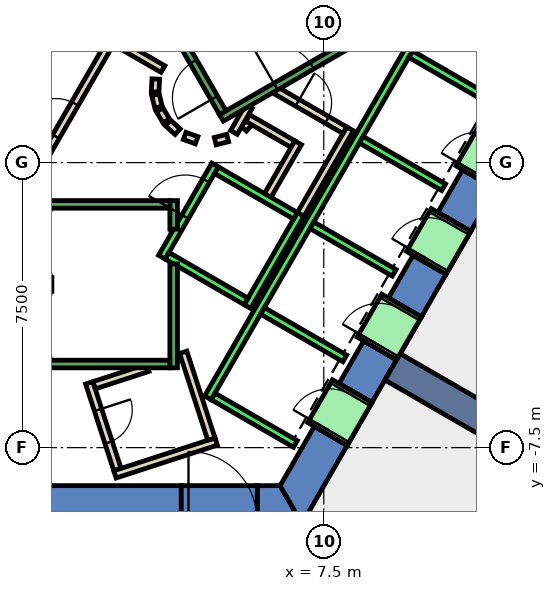
"""IFC4 building model, lengths in metres.
Left out: names, types, materials, properties, quantities, classifications, styles, units other than length and angle.
Written with IfcOpenShell. Run it as: python <this file> out.ifc"""

import sys

from ifc_helpers import new_model, si_unit, direction, frame, frame_2d, origin, place, context, subcontext, project, spatial, polyline, rectangle, outline, extrude, element, fill, save


model = new_model("IFC4")
c1 = context("Model", 3, precision=1e-05, world=origin(), true_north=direction((0.0, 1.0)))
c2 = subcontext(c1, "Body", "Model", "MODEL_VIEW")
j1 = project(units=[si_unit("LENGTHUNIT", "METRE"), si_unit("PLANEANGLEUNIT", "RADIAN")], contexts=[c1])
p1 = place(None, origin())
s1 = spatial("IfcSite", under=j1, at=p1, CompositionType="ELEMENT")
p2 = place(p1, origin())
s2 = spatial("IfcBuilding", under=s1, at=p2, CompositionType="ELEMENT")
p3 = place(p2, frame((0.0, 0.0, 30.0)))
s3 = spatial("IfcBuildingStorey", under=s2, at=p3, CompositionType="ELEMENT", Elevation=30.0)
p4 = place(p3, frame((0.0, 0.0, -0.45)))
e1 = element("IfcWall", 1, at=p4, inside=s3, PredefinedType="SHEAR", context=c2, shape_type="SweptSolid", body=[
    extrude(outline(polyline([(8.517, 11.748), (7.651, 11.248), (12.702, 2.5), (13.856, 2.5), (8.517, 11.748)])), origin(), (0.0, 0.0, 1.0), 4.85),
])
p5 = place(p3, frame((0.0, 0.0, -0.45)))
e2 = element("IfcWall", 2, at=p5, inside=s3, PredefinedType="SHEAR", context=c2, shape_type="SweptSolid", body=[
    extrude(outline(polyline([(3.75, -9.5), (3.75, -8.5), (-6.351, -8.5), (-6.928, -9.5), (3.75, -9.5)])), origin(), (0.0, 0.0, 1.0), 4.85),
])
p6 = place(p3, frame((0.0, 0.0, -0.45)))
e3 = element("IfcWall", 3, at=p6, inside=s3, PredefinedType="SHEAR", context=c2, shape_type="SweptSolid", body=[
    extrude(outline(polyline([(5.75, -8.5), (5.75, -9.5), (6.928, -9.5), (6.351, -8.5), (5.75, -8.5)])), origin(), (0.0, 0.0, 1.0), 4.85),
])
p7 = place(p3, frame((0.0, 0.0, 3.6)))
e4 = element("IfcWall", 4, at=p7, inside=s3, PredefinedType="SHEAR", context=c2, shape_type="SweptSolid", body=[
    extrude(outline(polyline([(5.75, -9.5), (5.75, -8.5), (3.75, -8.5), (3.75, -9.5), (5.75, -9.5)])), origin(), (0.0, 0.0, 1.0), 0.8),
])
p8 = place(p3, frame((0.0, 0.0, -0.45)))
e5 = element("IfcWall", 5, at=p8, inside=s3, PredefinedType="SHEAR", context=c2, shape_type="SweptSolid", body=[
    extrude(outline(polyline([(8.117, -7.44), (7.252, -6.94), (6.351, -8.5), (6.928, -9.5), (8.117, -7.44)])), origin(), (0.0, 0.0, 1.0), 4.85),
])
p9 = place(p3, frame((0.0, 0.0, -0.45)))
e6 = element("IfcWall", 6, at=p9, inside=s3, PredefinedType="SHEAR", context=c2, shape_type="SweptSolid", body=[
    extrude(outline(polyline([(9.417, -5.189), (8.551, -4.689), (7.902, -5.814), (8.767, -6.314), (9.417, -5.189)])), origin(), (0.0, 0.0, 1.0), 4.85),
])
p10 = place(p3, frame((0.0, 0.0, -0.45)))
e7 = element("IfcWall", 7, at=p10, inside=s3, PredefinedType="SHEAR", context=c2, shape_type="SweptSolid", body=[
    extrude(outline(polyline([(10.717, -2.937), (9.851, -2.437), (9.201, -3.563), (10.067, -4.063), (10.717, -2.937)])), origin(), (0.0, 0.0, 1.0), 4.85),
])
p11 = place(p3, frame((0.0, 0.0, -0.45)))
e8 = element("IfcWall", 8, at=p11, inside=s3, PredefinedType="SHEAR", context=c2, shape_type="SweptSolid", body=[
    extrude(outline(polyline([(12.017, -0.686), (11.151, -0.186), (10.501, -1.311), (11.367, -1.811), (12.017, -0.686)])), origin(), (0.0, 0.0, 1.0), 4.85),
])
p12 = place(p3, frame((0.0, 0.0, 3.6)))
e9 = element("IfcWall", 9, at=p12, inside=s3, PredefinedType="SHEAR", context=c2, shape_type="SweptSolid", body=[
    extrude(outline(polyline([(8.767, -6.314), (7.902, -5.814), (7.252, -6.94), (8.117, -7.44), (8.767, -6.314)])), origin(), (0.0, 0.0, 1.0), 0.8),
])
p13 = place(p3, frame((0.0, 0.0, 3.6)))
e10 = element("IfcWall", 10, at=p13, inside=s3, PredefinedType="SHEAR", context=c2, shape_type="SweptSolid", body=[
    extrude(outline(polyline([(10.067, -4.063), (9.201, -3.563), (8.551, -4.689), (9.417, -5.189), (10.067, -4.063)])), origin(), (0.0, 0.0, 1.0), 0.8),
])
p14 = place(p3, frame((0.0, 0.0, 3.6)))
e11 = element("IfcWall", 11, at=p14, inside=s3, PredefinedType="SHEAR", context=c2, shape_type="SweptSolid", body=[
    extrude(outline(polyline([(11.367, -1.811), (10.501, -1.311), (9.851, -2.437), (10.717, -2.937), (11.367, -1.811)])), origin(), (0.0, 0.0, 1.0), 0.8),
])
p15 = place(p3, frame((0.0, 0.0, 3.6)))
e12 = element("IfcWall", 12, at=p15, inside=s3, PredefinedType="SHEAR", context=c2, shape_type="SweptSolid", body=[
    extrude(outline(polyline([(12.667, 0.44), (11.801, 0.94), (11.151, -0.186), (12.017, -0.686), (12.667, 0.44)])), origin(), (0.0, 0.0, 1.0), 0.8),
])
p16 = place(p3, frame((9.31, -5.375, -0.45), z_axis=(0.0, 0.0, 1.0), x_axis=(0.866017533419, -0.500013631625, 0.0)))
e13 = element("IfcWall", 13, at=p16, inside=s3, PredefinedType="SHEAR", context=c2, shape_type="SweptSolid", body=[
    extrude(rectangle(XDim=9.0, YDim=0.8, at=frame_2d((4.5, 0.0))), origin(), (0.0, 0.0, 1.0), 4.85),
])
p17 = place(p3, frame((5.39, 0.898, 0.0), z_axis=(0.0, 0.0, 1.0), x_axis=(0.673828488714, 0.738887791073, 0.0)))
e14 = element("IfcWall", 14, at=p17, inside=s3, PredefinedType="PARTITIONING", context=c2, shape_type="SweptSolid", body=[
    extrude(rectangle(XDim=0.263, YDim=0.2, at=frame_2d((0.131, 0.0))), origin(), (0.0, 0.0, 1.0), 4.4),
])
p18 = place(p3, frame((5.499, 1.172, 0.0), z_axis=(0.0, 0.0, 1.0), x_axis=(0.866333505267, -0.499465972466, 0.0)))
e15 = element("IfcWall", 15, at=p18, inside=s3, PredefinedType="PARTITIONING", context=c2, shape_type="SweptSolid", body=[
    extrude(rectangle(XDim=1.374, YDim=0.2, at=frame_2d((0.687, 0.0))), origin(), (0.0, 0.0, 1.0), 4.4),
])
p19 = place(p3, frame((6.826, 0.522, 0.0), z_axis=(0.0, 0.0, 1.0), x_axis=(-0.500016722714, -0.866015748706, 0.0)))
e16 = element("IfcWall", 16, at=p19, inside=s3, PredefinedType="PARTITIONING", context=c2, shape_type="SweptSolid", body=[
    extrude(rectangle(XDim=1.7, YDim=0.2, at=frame_2d((0.85, 0.0))), origin(), (0.0, 0.0, 1.0), 4.4),
])
p20 = place(p3, frame((8.192, 0.888, 0.0), z_axis=(0.0, 0.0, 1.0), x_axis=(-0.499940625693, -0.866059680843, 0.0)))
e17 = element("IfcWall", 17, at=p20, inside=s3, PredefinedType="PARTITIONING", context=c2, shape_type="SweptSolid", body=[
    extrude(rectangle(XDim=2.68, YDim=0.2, at=frame_2d((1.34, 0.0))), origin(), (0.0, 0.0, 1.0), 4.4),
])
p21 = place(p3, frame((5.135, 0.793, 0.0), z_axis=(0.0, 0.0, 1.0), x_axis=(0.499526442893, 0.866298639529, 0.0)))
e18 = element("IfcWall", 18, at=p21, inside=s3, PredefinedType="PARTITIONING", context=c2, shape_type="SweptSolid", body=[
    extrude(rectangle(XDim=0.791, YDim=0.2, at=frame_2d((0.396, 0.0))), origin(), (0.0, 0.0, 1.0), 4.4),
])
p22 = place(p3, frame((6.25, 1.894, 0.0), z_axis=(0.0, 0.0, 1.0), x_axis=(0.866043184279, -0.499969202016, 0.0)))
e19 = element("IfcWall", 19, at=p22, inside=s3, PredefinedType="PARTITIONING", context=c2, shape_type="SweptSolid", body=[
    extrude(rectangle(XDim=2.084, YDim=0.2, at=frame_2d((1.042, 0.0))), origin(), (0.0, 0.0, 1.0), 4.4),
])
p23 = place(p22, frame((0.642, 0.0, 0.0)))
e20 = element("IfcOpeningElement", 20, at=p23, cuts=e19, PredefinedType="OPENING", context=c2, shape_type="SweptSolid", body=[
    extrude(rectangle(XDim=0.9, YDim=2.1, at=frame_2d((0.45, 1.05))), frame((0.0, 0.11, 0.0), z_axis=(0.0, -1.0, 0.0), x_axis=(1.0, 0.0, 0.0)), (0.0, 0.0, 1.0), 0.22),
])
p24 = place(p3, frame((2.869, -5.4, 0.0), z_axis=(0.0, 0.0, 1.0), x_axis=(-0.950892787506, -0.309520446287, 0.0)))
e21 = element("IfcWall", 21, at=p24, inside=s3, PredefinedType="PARTITIONING", context=c2, shape_type="SweptSolid", body=[
    extrude(rectangle(XDim=1.487, YDim=0.2, at=frame_2d((0.743, 0.0))), origin(), (0.0, 0.0, 1.0), 4.4),
])
p25 = place(p3, frame((1.328, -5.795, 0.0), z_axis=(0.0, 0.0, 1.0), x_axis=(0.309171157328, -0.951006411901, 0.0)))
e22 = element("IfcWall", 22, at=p25, inside=s3, PredefinedType="PARTITIONING", context=c2, shape_type="SweptSolid", body=[
    extrude(rectangle(XDim=2.401, YDim=0.2, at=frame_2d((1.2, 0.0))), origin(), (0.0, 0.0, 1.0), 4.4),
])
p26 = place(p25, frame((0.75, 0.0, 0.0)))
e23 = element("IfcOpeningElement", 23, at=p26, cuts=e22, PredefinedType="OPENING", context=c2, shape_type="SweptSolid", body=[
    extrude(rectangle(XDim=0.9, YDim=2.1, at=frame_2d((0.45, 1.05))), frame((0.0, 0.11, 0.0), z_axis=(0.0, -1.0, 0.0), x_axis=(1.0, 0.0, 0.0)), (0.0, 0.0, 1.0), 0.22),
])
p27 = place(p3, frame((2.006, -8.204, 0.0), z_axis=(0.0, 0.0, 1.0), x_axis=(0.951079555704, 0.308946077369, 0.0)))
e24 = element("IfcWall", 24, at=p27, inside=s3, PredefinedType="PARTITIONING", context=c2, shape_type="SweptSolid", body=[
    extrude(rectangle(XDim=2.8, YDim=0.2, at=frame_2d((1.4, 0.0))), origin(), (0.0, 0.0, 1.0), 4.4),
])
p28 = place(p3, frame((4.543, -7.275, 0.0), z_axis=(0.0, 0.0, 1.0), x_axis=(-0.309079173229, 0.951036310914, 0.0)))
e25 = element("IfcWall", 25, at=p28, inside=s3, PredefinedType="PARTITIONING", context=c2, shape_type="SweptSolid", body=[
    extrude(rectangle(XDim=2.4, YDim=0.2, at=frame_2d((1.2, 0.0))), origin(), (0.0, 0.0, 1.0), 4.4),
])
p29 = place(p3, frame((3.079, 2.199, 0.0), z_axis=(0.0, 0.0, 1.0), x_axis=(-0.047771483479, -0.998858290933, 0.0)))
e26 = element("IfcWall", 26, at=p29, inside=s3, PredefinedType="PARTITIONING", context=c2, shape_type="SweptSolid", body=[
    extrude(rectangle(XDim=0.337, YDim=0.2, at=frame_2d((0.169, 0.0))), origin(), (0.0, 0.0, 1.0), 4.4),
])
p30 = place(p3, frame((3.07, 1.786, 0.0), z_axis=(0.0, 0.0, 1.0), x_axis=(0.242705583207, -0.970099994784, 0.0)))
e27 = element("IfcWall", 27, at=p30, inside=s3, PredefinedType="PARTITIONING", context=c2, shape_type="SweptSolid", body=[
    extrude(rectangle(XDim=0.338, YDim=0.2, at=frame_2d((0.169, 0.0))), origin(), (0.0, 0.0, 1.0), 4.4),
])
for number, where, z_axis, x_axis in (
    (28, (3.182, 1.388, 0.0), (0.0, 0.0, 1.0), (0.512, -0.859, 0.0)),
    (29, (3.404, 1.039, 0.0), (0.0, 0.0, 1.0), (0.74, -0.672, 0.0)),
):
    element("IfcWall", number, at=place(p3, frame(where, z_axis=z_axis, x_axis=x_axis)), inside=s3, PredefinedType="PARTITIONING", context=c2, shape_type="SweptSolid", body=[
        extrude(rectangle(XDim=0.338, YDim=0.2, at=frame_2d((0.169, 0.0))), origin(), (0.0, 0.0, 1.0), 4.4),
    ])
p31 = place(p3, frame((3.838, 0.702, 0.0), z_axis=(0.0, 0.0, 1.0), x_axis=(0.941035081519, -0.338308993895, 0.0)))
e30 = element("IfcWall", 30, at=p31, inside=s3, PredefinedType="PARTITIONING", context=c2, shape_type="SweptSolid", body=[
    extrude(rectangle(XDim=0.337, YDim=0.2, at=frame_2d((0.168, 0.0))), origin(), (0.0, 0.0, 1.0), 4.4),
])
p32 = place(p3, frame((4.644, 0.564, 0.0), z_axis=(0.0, 0.0, 1.0), x_axis=(0.969929076366, 0.243387729394, 0.0)))
e31 = element("IfcWall", 31, at=p32, inside=s3, PredefinedType="PARTITIONING", context=c2, shape_type="SweptSolid", body=[
    extrude(rectangle(XDim=0.337, YDim=0.2, at=frame_2d((0.168, 0.0))), origin(), (0.0, 0.0, 1.0), 4.4),
])
p33 = place(p3, frame((-0.52, -1.0, 0.0), z_axis=(0.0, 0.0, 1.0), x_axis=(0.50011622646, 0.865958290007, 0.0)))
e32 = element("IfcWall", 32, at=p33, inside=s3, PredefinedType="PARTITIONING", context=c2, shape_type="SweptSolid", body=[
    extrude(rectangle(XDim=4.991, YDim=0.2, at=frame_2d((2.496, 0.0))), origin(), (0.0, 0.0, 1.0), 4.4),
])
p34 = place(p33, frame((1.945, 0.0, 0.0)))
e33 = element("IfcOpeningElement", 33, at=p34, cuts=e32, PredefinedType="OPENING", context=c2, shape_type="SweptSolid", body=[
    extrude(rectangle(XDim=1.0, YDim=2.1, at=frame_2d((0.5, 1.05))), frame((0.0, 0.11, 0.0), z_axis=(0.0, -1.0, 0.0), x_axis=(1.0, 0.0, 0.0)), (0.0, 0.0, 1.0), 0.22),
])
p35 = place(p3, frame((2.012, 3.186, 0.0), z_axis=(0.0, 0.0, 1.0), x_axis=(0.865891012941, -0.500232699559, 0.0)))
e34 = element("IfcWall", 34, at=p35, inside=s3, PredefinedType="PARTITIONING", context=c2, shape_type="SweptSolid", body=[
    extrude(rectangle(XDim=1.449, YDim=0.2, at=frame_2d((0.725, 0.0))), origin(), (0.0, 0.0, 1.0), 4.4),
])
p36 = place(p3, frame((3.24, -2.488, 0.0), z_axis=(0.0, 0.0, 1.0), x_axis=(0.49994636267, 0.866056369097, 0.0)))
e35 = element("IfcWall", 35, at=p36, inside=s3, PredefinedType="STANDARD", context=c2, shape_type="SweptSolid", body=[
    extrude(rectangle(XDim=2.8, YDim=0.2, at=frame_2d((1.4, 0.0))), origin(), (0.0, 0.0, 1.0), 4.4),
])
p37 = place(p36, frame((1.225, 0.0, 0.0)))
e36 = element("IfcOpeningElement", 36, at=p37, cuts=e35, PredefinedType="OPENING", context=c2, shape_type="SweptSolid", body=[
    extrude(rectangle(XDim=1.1, YDim=2.1, at=frame_2d((0.55, 1.05))), frame((0.0, 0.11, 0.0), z_axis=(0.0, -1.0, 0.0), x_axis=(1.0, 0.0, 0.0)), (0.0, 0.0, 1.0), 0.22),
])
p38 = place(p3, frame((5.492, -3.788, 0.0), z_axis=(0.0, 0.0, 1.0), x_axis=(0.500011755427, 0.866018616679, 0.0)))
e37 = element("IfcWall", 37, at=p38, inside=s3, PredefinedType="STANDARD", context=c2, shape_type="SweptSolid", body=[
    extrude(rectangle(XDim=2.8, YDim=0.2, at=frame_2d((1.4, 0.0))), origin(), (0.0, 0.0, 1.0), 4.4),
])
p39 = place(p3, frame((3.377, -2.452, 0.0), z_axis=(0.0, 0.0, 1.0), x_axis=(0.865955154139, -0.50012165622, 0.0)))
e38 = element("IfcWall", 38, at=p39, inside=s3, PredefinedType="STANDARD", context=c2, shape_type="SweptSolid", body=[
    extrude(rectangle(XDim=2.4, YDim=0.2, at=frame_2d((1.2, 0.0))), origin(), (0.0, 0.0, 1.0), 4.4),
])
p40 = place(p3, frame((4.677, -0.2, 0.0), z_axis=(0.0, 0.0, 1.0), x_axis=(0.865973769406, -0.500089422704, 0.0)))
e39 = element("IfcWall", 39, at=p40, inside=s3, PredefinedType="STANDARD", context=c2, shape_type="SweptSolid", body=[
    extrude(rectangle(XDim=2.399, YDim=0.2, at=frame_2d((1.2, 0.0))), origin(), (0.0, 0.0, 1.0), 4.4),
])
p41 = place(p3, frame((4.451, -6.19, 0.0), z_axis=(0.0, 0.0, 1.0), x_axis=(0.50000090737, 0.866024879913, 0.0)))
e40 = element("IfcWall", 40, at=p41, inside=s3, PredefinedType="STANDARD", context=c2, shape_type="SweptSolid", body=[
    extrude(rectangle(XDim=10.6, YDim=0.2, at=frame_2d((5.3, 0.0))), origin(), (0.0, 0.0, 1.0), 4.4),
])
for number, where, z_axis, x_axis in (
    (41, (4.588, -6.153, 0.0), (0.0, 0.0, 1.0), (0.866, -0.5, 0.0)),
    (42, (5.888, -3.902, 0.0), (0.0, 0.0, 1.0), (0.866, -0.5, 0.0)),
    (43, (7.188, -1.65, 0.0), (0.0, 0.0, 1.0), (0.866, -0.5, 0.0)),
    (44, (8.488, 0.602, 0.0), (0.0, 0.0, 1.0), (0.866, -0.5, 0.0)),
):
    element("IfcWall", number, at=place(p3, frame(where, z_axis=z_axis, x_axis=x_axis)), inside=s3, PredefinedType="STANDARD", context=c2, shape_type="SweptSolid", body=[
        extrude(rectangle(XDim=2.5, YDim=0.2, at=frame_2d((1.25, 0.0))), origin(), (0.0, 0.0, 1.0), 4.4),
    ])
p42 = place(p3, frame((9.788, 2.853, 0.0), z_axis=(0.0, 0.0, 1.0), x_axis=(0.865998541277, -0.500046524342, 0.0)))
e45 = element("IfcWall", 45, at=p42, inside=s3, PredefinedType="STANDARD", context=c2, shape_type="SweptSolid", body=[
    extrude(rectangle(XDim=2.5, YDim=0.2, at=frame_2d((1.25, 0.0))), origin(), (0.0, 0.0, 1.0), 4.4),
])
p43 = place(p3, frame((7.598, -7.14, 0.0), z_axis=(0.0, 0.0, 1.0), x_axis=(0.500362116554, 0.865816234728, 0.0)))
e46 = element("IfcWall", 46, at=p43, inside=s3, PredefinedType="STANDARD", context=c2, shape_type="SweptSolid", body=[
    extrude(rectangle(XDim=1.299, YDim=1.2, at=frame_2d((0.65, 0.0))), origin(), (0.0, 0.0, 1.0), 2.4),
])
p44 = place(p43, frame((0.1, 0.0, 0.0)))
e47 = element("IfcOpeningElement", 47, at=p44, cuts=e46, PredefinedType="OPENING", context=c2, shape_type="SweptSolid", body=[
    extrude(rectangle(XDim=1.1, YDim=2.3, at=frame_2d((0.55, 1.15))), frame((0.0, 0.61, 0.0), z_axis=(0.0, -1.0, 0.0), x_axis=(1.0, 0.0, 0.0)), (0.0, 0.0, 1.0), 1.22),
])
p45 = place(p3, frame((8.898, -4.889, 0.0), z_axis=(0.0, 0.0, 1.0), x_axis=(0.500036693733, 0.866004217611, 0.0)))
e48 = element("IfcWall", 48, at=p45, inside=s3, PredefinedType="STANDARD", context=c2, shape_type="SweptSolid", body=[
    extrude(rectangle(XDim=1.3, YDim=1.2, at=frame_2d((0.65, 0.0))), origin(), (0.0, 0.0, 1.0), 2.4),
])
p46 = place(p45, frame((0.1, 0.0, 0.0)))
e49 = element("IfcOpeningElement", 49, at=p46, cuts=e48, PredefinedType="OPENING", context=c2, shape_type="SweptSolid", body=[
    extrude(rectangle(XDim=1.1, YDim=2.3, at=frame_2d((0.55, 1.15))), frame((0.0, 0.61, 0.0), z_axis=(0.0, -1.0, 0.0), x_axis=(1.0, 0.0, 0.0)), (0.0, 0.0, 1.0), 1.22),
])
p47 = place(p3, frame((10.198, -2.637, 0.0), z_axis=(0.0, 0.0, 1.0), x_axis=(0.49989585183, 0.866085525409, 0.0)))
e50 = element("IfcWall", 50, at=p47, inside=s3, PredefinedType="STANDARD", context=c2, shape_type="SweptSolid", body=[
    extrude(rectangle(XDim=1.3, YDim=1.2, at=frame_2d((0.65, 0.0))), origin(), (0.0, 0.0, 1.0), 2.4),
])
p48 = place(p47, frame((0.1, 0.0, 0.0)))
e51 = element("IfcOpeningElement", 51, at=p48, cuts=e50, PredefinedType="OPENING", context=c2, shape_type="SweptSolid", body=[
    extrude(rectangle(XDim=1.1, YDim=2.3, at=frame_2d((0.55, 1.15))), frame((0.0, 0.61, 0.0), z_axis=(0.0, -1.0, 0.0), x_axis=(1.0, 0.0, 0.0)), (0.0, 0.0, 1.0), 1.22),
])
p49 = place(p3, frame((11.498, -0.385, 0.0), z_axis=(0.0, 0.0, 1.0), x_axis=(0.500221244143, 0.865897630733, 0.0)))
e52 = element("IfcWall", 52, at=p49, inside=s3, PredefinedType="STANDARD", context=c2, shape_type="SweptSolid", body=[
    extrude(rectangle(XDim=1.299, YDim=1.2, at=frame_2d((0.65, 0.0))), origin(), (0.0, 0.0, 1.0), 2.4),
])
p50 = place(p49, frame((0.1, 0.0, 0.0)))
e53 = element("IfcOpeningElement", 53, at=p50, cuts=e52, PredefinedType="OPENING", context=c2, shape_type="SweptSolid", body=[
    extrude(rectangle(XDim=1.1, YDim=2.3, at=frame_2d((0.55, 1.15))), frame((0.0, 0.61, 0.0), z_axis=(0.0, -1.0, 0.0), x_axis=(1.0, 0.0, 0.0)), (0.0, 0.0, 1.0), 1.22),
])
p51 = place(p3, frame((3.55, -2.667, 0.0), z_axis=(0.0, 0.0, 1.0), x_axis=(0.0, -1.0, 0.0)))
e54 = element("IfcWall", 54, at=p51, inside=s3, PredefinedType="STANDARD", context=c2, shape_type="SweptSolid", body=[
    extrude(rectangle(XDim=2.733, YDim=0.2, at=frame_2d((1.366, 0.0))), origin(), (0.0, 0.0, 1.0), 4.4),
])
p52 = place(p3, frame((3.55, -1.0, 0.0), z_axis=(0.0, 0.0, 1.0), x_axis=(0.0, -1.0, 0.0)))
e55 = element("IfcWall", 55, at=p52, inside=s3, PredefinedType="STANDARD", context=c2, shape_type="SweptSolid", body=[
    extrude(rectangle(XDim=0.751, YDim=0.2, at=frame_2d((0.375, 0.0))), origin(), (0.0, 0.0, 1.0), 4.4),
])
p53 = place(p3, frame((-3.45, -1.1, 0.0), z_axis=(0.0, 0.0, 1.0), x_axis=(1.0, 0.0, 0.0)))
e56 = element("IfcWall", 56, at=p53, inside=s3, PredefinedType="STANDARD", context=c2, shape_type="SweptSolid", body=[
    extrude(rectangle(XDim=6.9, YDim=0.2, at=frame_2d((3.45, 0.0))), origin(), (0.0, 0.0, 1.0), 4.4),
])
p54 = place(p53, frame((0.45, 0.0, 0.0)))
e57 = element("IfcOpeningElement", 57, at=p54, cuts=e56, PredefinedType="OPENING", context=c2, shape_type="SweptSolid", body=[
    extrude(rectangle(XDim=1.1, YDim=2.2, at=frame_2d((0.55, 1.1))), frame((0.0, 0.11, 0.0), z_axis=(0.0, -1.0, 0.0), x_axis=(1.0, 0.0, 0.0)), (0.0, 0.0, 1.0), 0.22),
])
p55 = place(p3, frame((-3.45, -5.3, 0.0), z_axis=(0.0, 0.0, 1.0), x_axis=(1.0, 0.0, 0.0)))
e58 = element("IfcWall", 58, at=p55, inside=s3, PredefinedType="STANDARD", context=c2, shape_type="SweptSolid", body=[
    extrude(rectangle(XDim=6.9, YDim=0.2, at=frame_2d((3.45, 0.0))), origin(), (0.0, 0.0, 1.0), 4.4),
])
p56 = place(p3, frame((4.806, 1.176, 0.0), z_axis=(0.0, 0.0, 1.0), x_axis=(0.866059941101, 0.499940174841, 0.0)))
e59 = element("IfcWall", 59, at=p56, inside=s3, PredefinedType="STANDARD", context=c2, shape_type="SweptSolid", body=[
    extrude(rectangle(XDim=4.4, YDim=0.2, at=frame_2d((2.2, 0.0))), origin(), (0.0, 0.0, 1.0), 4.4),
])
p57 = place(p56, frame((1.65, 0.0, 0.0)))
e60 = element("IfcOpeningElement", 60, at=p57, cuts=e59, PredefinedType="OPENING", context=c2, shape_type="SweptSolid", body=[
    extrude(rectangle(XDim=1.1, YDim=2.2, at=frame_2d((0.55, 1.1))), frame((0.0, 0.11, 0.0), z_axis=(0.0, -1.0, 0.0), x_axis=(1.0, 0.0, 0.0)), (0.0, 0.0, 1.0), 0.22),
])
p58 = place(p3, frame((4.843, 1.312, 0.0), z_axis=(0.0, 0.0, 1.0), x_axis=(-0.499963383562, 0.866046543262, 0.0)))
e61 = element("IfcWall", 61, at=p58, inside=s3, PredefinedType="STANDARD", context=c2, shape_type="SweptSolid", body=[
    extrude(rectangle(XDim=6.9, YDim=0.2, at=frame_2d((3.45, 0.0))), origin(), (0.0, 0.0, 1.0), 4.4),
])
p59 = place(p58, frame((0.45, 0.0, 0.0)))
e62 = element("IfcOpeningElement", 62, at=p59, cuts=e61, PredefinedType="OPENING", context=c2, shape_type="SweptSolid", body=[
    extrude(rectangle(XDim=1.1, YDim=2.2, at=frame_2d((0.55, 1.1))), frame((0.0, 0.11, 0.0), z_axis=(0.0, -1.0, 0.0), x_axis=(1.0, 0.0, 0.0)), (0.0, 0.0, 1.0), 0.22),
])
p60 = place(p34, origin())
e63 = element("IfcDoor", 63, at=p60, inside=s3, OperationType="SINGLE_SWING_LEFT", PredefinedType="DOOR", context=c2, shape_type="SweptSolid", body=[
    extrude(rectangle(XDim=1.0, YDim=2.1, at=frame_2d((0.5, 1.05))), frame((0.0, 0.025, 0.0), z_axis=(0.0, -1.0, 0.0), x_axis=(1.0, 0.0, 0.0)), (0.0, 0.0, 1.0), 0.05),
])
fill(e33, e63)
p61 = place(p23, origin())
e64 = element("IfcDoor", 64, at=p61, inside=s3, OperationType="SINGLE_SWING_LEFT", PredefinedType="DOOR", context=c2, shape_type="SweptSolid", body=[
    extrude(rectangle(XDim=0.9, YDim=2.1, at=frame_2d((0.45, 1.05))), frame((0.0, 0.025, 0.0), z_axis=(0.0, -1.0, 0.0), x_axis=(1.0, 0.0, 0.0)), (0.0, 0.0, 1.0), 0.05),
])
fill(e20, e64)
p62 = place(p26, origin())
e65 = element("IfcDoor", 65, at=p62, inside=s3, OperationType="SINGLE_SWING_LEFT", PredefinedType="DOOR", context=c2, shape_type="SweptSolid", body=[
    extrude(rectangle(XDim=0.9, YDim=2.1, at=frame_2d((0.45, 1.05))), frame((0.0, 0.025, 0.0), z_axis=(0.0, -1.0, 0.0), x_axis=(1.0, 0.0, 0.0)), (0.0, 0.0, 1.0), 0.05),
])
fill(e23, e65)
p63 = place(p44, origin())
e66 = element("IfcDoor", 66, at=p63, inside=s3, OperationType="SLIDING_TO_LEFT", PredefinedType="DOOR", context=c2, shape_type="SweptSolid", body=[
    extrude(rectangle(XDim=1.1, YDim=2.3, at=frame_2d((0.55, 1.15))), frame((0.0, 0.025, 0.0), z_axis=(0.0, -1.0, 0.0), x_axis=(1.0, 0.0, 0.0)), (0.0, 0.0, 1.0), 0.05),
])
fill(e47, e66)
p64 = place(p46, origin())
e67 = element("IfcDoor", 67, at=p64, inside=s3, OperationType="SLIDING_TO_LEFT", PredefinedType="DOOR", context=c2, shape_type="SweptSolid", body=[
    extrude(rectangle(XDim=1.1, YDim=2.3, at=frame_2d((0.55, 1.15))), frame((0.0, 0.025, 0.0), z_axis=(0.0, -1.0, 0.0), x_axis=(1.0, 0.0, 0.0)), (0.0, 0.0, 1.0), 0.05),
])
fill(e49, e67)
p65 = place(p48, origin())
e68 = element("IfcDoor", 68, at=p65, inside=s3, OperationType="SLIDING_TO_LEFT", PredefinedType="DOOR", context=c2, shape_type="SweptSolid", body=[
    extrude(rectangle(XDim=1.1, YDim=2.3, at=frame_2d((0.55, 1.15))), frame((0.0, 0.025, 0.0), z_axis=(0.0, -1.0, 0.0), x_axis=(1.0, 0.0, 0.0)), (0.0, 0.0, 1.0), 0.05),
])
fill(e51, e68)
p66 = place(p37, origin())
e69 = element("IfcDoor", 69, at=p66, inside=s3, OperationType="SLIDING_TO_LEFT", PredefinedType="DOOR", context=c2, shape_type="SweptSolid", body=[
    extrude(rectangle(XDim=1.1, YDim=2.1, at=frame_2d((0.55, 1.05))), frame((0.0, 0.025, 0.0), z_axis=(0.0, -1.0, 0.0), x_axis=(1.0, 0.0, 0.0)), (0.0, 0.0, 1.0), 0.05),
])
fill(e36, e69)
p67 = place(p59, origin())
e70 = element("IfcDoor", 70, at=p67, inside=s3, OperationType="SINGLE_SWING_LEFT", PredefinedType="DOOR", context=c2, shape_type="SweptSolid", body=[
    extrude(rectangle(XDim=1.1, YDim=2.2, at=frame_2d((0.55, 1.1))), frame((0.0, 0.025, 0.0), z_axis=(0.0, -1.0, 0.0), x_axis=(1.0, 0.0, 0.0)), (0.0, 0.0, 1.0), 0.05),
])
fill(e62, e70)
p68 = place(p57, origin())
e71 = element("IfcDoor", 71, at=p68, inside=s3, OperationType="SINGLE_SWING_LEFT", PredefinedType="DOOR", context=c2, shape_type="SweptSolid", body=[
    extrude(rectangle(XDim=1.1, YDim=2.2, at=frame_2d((0.55, 1.1))), frame((0.0, 0.025, 0.0), z_axis=(0.0, -1.0, 0.0), x_axis=(1.0, 0.0, 0.0)), (0.0, 0.0, 1.0), 0.05),
])
fill(e60, e71)
save(model, sys.argv[1])
